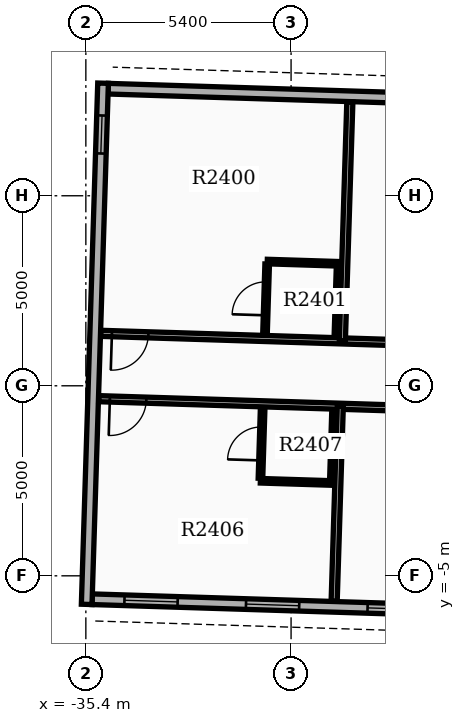
"""IFC4 building model, lengths in metres.
Left out: names, types, materials, properties, quantities, classifications, styles, units other than length and angle.
Written with IfcOpenShell. Run it as: python <this file> out.ifc"""

import sys

from ifc_helpers import new_model, si_unit, direction, frame, frame_2d, origin, place, context, subcontext, project, spatial, rectangle, extrude, element, fill, save


model = new_model("IFC4")
c1 = context("Model", 3, precision=1e-05, world=origin(), true_north=direction((0.0, 1.0)))
c2 = subcontext(c1, "Body", "Model", "MODEL_VIEW")
j1 = project(units=[si_unit("LENGTHUNIT", "METRE"), si_unit("PLANEANGLEUNIT", "RADIAN")], contexts=[c1])
p1 = place(None, origin())
s1 = spatial("IfcSite", under=j1, at=p1, CompositionType="ELEMENT")
p2 = place(p1, origin())
s2 = spatial("IfcBuilding", under=s1, at=p2, CompositionType="ELEMENT")
p3 = place(p2, frame((0.0, 0.0, 152.7)))
s3 = spatial("IfcBuildingStorey", under=s2, at=p3, CompositionType="ELEMENT", Elevation=152.7)
p4 = place(p3, frame((-14.721, 7.186, 0.0), z_axis=(0.0, 0.0, 1.0), x_axis=(-0.999506574096, 0.031410322165, 0.0)))
e1 = element("IfcWall", 1, at=p4, inside=s3, PredefinedType="STANDARD", context=c2, shape_type="SweptSolid", body=[
    extrude(rectangle(XDim=20.1, YDim=0.28, at=frame_2d((10.05, 0.0))), origin(), (0.0, 0.0, 1.0), 2.97),
])
p5 = place(p4, frame((0.85, 0.0, 0.8)))
e2 = element("IfcOpeningElement", 2, at=p5, cuts=e1, PredefinedType="OPENING", context=c2, shape_type="SweptSolid", body=[
    extrude(rectangle(XDim=1.4, YDim=1.6, at=frame_2d((0.7, 0.8))), frame((0.0, 0.15, 0.0), z_axis=(0.0, -1.0, 0.0), x_axis=(1.0, 0.0, 0.0)), (0.0, 0.0, 1.0), 0.3),
])
p6 = place(p4, frame((4.05, 0.0, 0.8)))
e3 = element("IfcOpeningElement", 3, at=p6, cuts=e1, PredefinedType="OPENING", context=c2, shape_type="SweptSolid", body=[
    extrude(rectangle(XDim=1.4, YDim=1.6, at=frame_2d((0.7, 0.8))), frame((0.0, 0.15, 0.0), z_axis=(0.0, -1.0, 0.0), x_axis=(1.0, 0.0, 0.0)), (0.0, 0.0, 1.0), 0.3),
])
p7 = place(p4, frame((7.25, 0.0, 0.8)))
e4 = element("IfcOpeningElement", 4, at=p7, cuts=e1, PredefinedType="OPENING", context=c2, shape_type="SweptSolid", body=[
    extrude(rectangle(XDim=1.4, YDim=1.6, at=frame_2d((0.7, 0.8))), frame((0.0, 0.15, 0.0), z_axis=(0.0, -1.0, 0.0), x_axis=(1.0, 0.0, 0.0)), (0.0, 0.0, 1.0), 0.3),
])
p8 = place(p4, frame((10.45, 0.0, 0.8)))
e5 = element("IfcOpeningElement", 5, at=p8, cuts=e1, PredefinedType="OPENING", context=c2, shape_type="SweptSolid", body=[
    extrude(rectangle(XDim=1.4, YDim=1.6, at=frame_2d((0.7, 0.8))), frame((0.0, 0.15, 0.0), z_axis=(0.0, -1.0, 0.0), x_axis=(1.0, 0.0, 0.0)), (0.0, 0.0, 1.0), 0.3),
])
p9 = place(p3, frame((-35.234, -5.616, 0.0), z_axis=(0.0, 0.0, 1.0), x_axis=(0.999506955354, -0.031398187845, 0.0)))
e6 = element("IfcWall", 6, at=p9, inside=s3, PredefinedType="STANDARD", context=c2, shape_type="SweptSolid", body=[
    extrude(rectangle(XDim=20.1, YDim=0.28, at=frame_2d((10.05, 0.0))), origin(), (0.0, 0.0, 1.0), 2.97),
])
p10 = place(p9, frame((0.85, 0.0, 0.8)))
e7 = element("IfcOpeningElement", 7, at=p10, cuts=e6, PredefinedType="OPENING", context=c2, shape_type="SweptSolid", body=[
    extrude(rectangle(XDim=1.4, YDim=1.6, at=frame_2d((0.7, 0.8))), frame((0.0, 0.15, 0.0), z_axis=(0.0, -1.0, 0.0), x_axis=(1.0, 0.0, 0.0)), (0.0, 0.0, 1.0), 0.3),
])
p11 = place(p9, frame((4.05, 0.0, 0.8)))
e8 = element("IfcOpeningElement", 8, at=p11, cuts=e6, PredefinedType="OPENING", context=c2, shape_type="SweptSolid", body=[
    extrude(rectangle(XDim=1.4, YDim=1.6, at=frame_2d((0.7, 0.8))), frame((0.0, 0.15, 0.0), z_axis=(0.0, -1.0, 0.0), x_axis=(1.0, 0.0, 0.0)), (0.0, 0.0, 1.0), 0.3),
])
p12 = place(p9, frame((7.25, 0.0, 0.8)))
e9 = element("IfcOpeningElement", 9, at=p12, cuts=e6, PredefinedType="OPENING", context=c2, shape_type="SweptSolid", body=[
    extrude(rectangle(XDim=1.4, YDim=1.6, at=frame_2d((0.7, 0.8))), frame((0.0, 0.15, 0.0), z_axis=(0.0, -1.0, 0.0), x_axis=(1.0, 0.0, 0.0)), (0.0, 0.0, 1.0), 0.3),
])
p13 = place(p9, frame((10.45, 0.0, 0.8)))
e10 = element("IfcOpeningElement", 10, at=p13, cuts=e6, PredefinedType="OPENING", context=c2, shape_type="SweptSolid", body=[
    extrude(rectangle(XDim=1.4, YDim=1.6, at=frame_2d((0.7, 0.8))), frame((0.0, 0.15, 0.0), z_axis=(0.0, -1.0, 0.0), x_axis=(1.0, 0.0, 0.0)), (0.0, 0.0, 1.0), 0.3),
])
p14 = place(p9, frame((14.035, 0.0, 0.85)))
e11 = element("IfcOpeningElement", 11, at=p14, cuts=e6, PredefinedType="OPENING", context=c2, shape_type="SweptSolid", body=[
    extrude(rectangle(XDim=1.2, YDim=1.6, at=frame_2d((0.6, 0.8))), frame((0.0, 0.15, 0.0), z_axis=(0.0, -1.0, 0.0), x_axis=(1.0, 0.0, 0.0)), (0.0, 0.0, 1.0), 0.3),
])
p15 = place(p3, frame((-34.947, 7.962, 0.0), z_axis=(0.0, 0.0, 1.0), x_axis=(-0.031406966164, -0.999506679556, 0.0)))
e12 = element("IfcWall", 12, at=p15, inside=s3, PredefinedType="STANDARD", context=c2, shape_type="SweptSolid", body=[
    extrude(rectangle(XDim=13.72, YDim=0.28, at=frame_2d((6.86, 0.0))), origin(), (0.0, 0.0, 1.0), 2.97),
])
p16 = place(p15, frame((0.85, 0.0, 0.85)))
e13 = element("IfcOpeningElement", 13, at=p16, cuts=e12, PredefinedType="OPENING", context=c2, shape_type="SweptSolid", body=[
    extrude(rectangle(XDim=1.0, YDim=1.5, at=frame_2d((0.5, 0.75))), frame((0.0, 0.15, 0.0), z_axis=(0.0, -1.0, 0.0), x_axis=(1.0, 0.0, 0.0)), (0.0, 0.0, 1.0), 0.3),
])
p17 = place(p3, frame((-14.834, 0.746, 0.0), z_axis=(0.0, 0.0, 1.0), x_axis=(-0.99950639469, 0.031416030536, 0.0)))
e14 = element("IfcWall", 14, at=p17, inside=s3, PredefinedType="PARTITIONING", context=c2, shape_type="SweptSolid", body=[
    extrude(rectangle(XDim=20.182, YDim=0.16, at=frame_2d((10.091, 0.0))), origin(), (0.0, 0.0, 1.0), 2.96),
])
p18 = place(p17, frame((2.661, 0.0, 0.0)))
e15 = element("IfcOpeningElement", 15, at=p18, cuts=e14, PredefinedType="OPENING", context=c2, shape_type="SweptSolid", body=[
    extrude(rectangle(XDim=0.96, YDim=2.15, at=frame_2d((0.48, 1.075))), frame((0.0, 0.09, 0.0), z_axis=(0.0, -1.0, 0.0), x_axis=(1.0, 0.0, 0.0)), (0.0, 0.0, 1.0), 0.18),
])
p19 = place(p17, frame((9.492, 0.0, 0.0)))
e16 = element("IfcOpeningElement", 16, at=p19, cuts=e14, PredefinedType="OPENING", context=c2, shape_type="SweptSolid", body=[
    extrude(rectangle(XDim=0.96, YDim=2.15, at=frame_2d((0.48, 1.075))), frame((0.0, 0.09, 0.0), z_axis=(0.0, -1.0, 0.0), x_axis=(1.0, 0.0, 0.0)), (0.0, 0.0, 1.0), 0.18),
])
p20 = place(p17, frame((18.93, 0.0, 0.0)))
e17 = element("IfcOpeningElement", 17, at=p20, cuts=e14, PredefinedType="OPENING", context=c2, shape_type="SweptSolid", body=[
    extrude(rectangle(XDim=0.96, YDim=2.15, at=frame_2d((0.48, 1.075))), frame((0.0, 0.09, 0.0), z_axis=(0.0, -1.0, 0.0), x_axis=(1.0, 0.0, 0.0)), (0.0, 0.0, 1.0), 0.18),
])
p21 = place(p3, frame((-28.651, 1.18, 0.0), z_axis=(0.0, 0.0, 1.0), x_axis=(0.031389803569, 0.999507218699, 0.0)))
e18 = element("IfcWall", 18, at=p21, inside=s3, PredefinedType="PARTITIONING", context=c2, shape_type="SweptSolid", body=[
    extrude(rectangle(XDim=6.292, YDim=0.16, at=frame_2d((3.146, 0.0))), origin(), (0.0, 0.0, 1.0), 2.96),
])
p22 = place(p3, frame((-30.686, 1.385, 0.0), z_axis=(0.0, 0.0, 1.0), x_axis=(0.03152371574, 0.999503004171, 0.0)))
e19 = element("IfcWall", 19, at=p22, inside=s3, PredefinedType="PARTITIONING", context=c2, shape_type="SweptSolid", body=[
    extrude(rectangle(XDim=1.82, YDim=0.12, at=frame_2d((0.91, 0.0))), origin(), (0.0, 0.0, 1.0), 2.96),
])
p23 = place(p22, frame((0.47, 0.0, 0.0)))
e20 = element("IfcOpeningElement", 20, at=p23, cuts=e19, PredefinedType="OPENING", context=c2, shape_type="SweptSolid", body=[
    extrude(rectangle(XDim=0.88, YDim=2.1, at=frame_2d((0.44, 1.05))), frame((0.0, 0.07, 0.0), z_axis=(0.0, -1.0, 0.0), x_axis=(1.0, 0.0, 0.0)), (0.0, 0.0, 1.0), 0.14),
])
p24 = place(p3, frame((-28.807, 1.325, 0.0), z_axis=(0.0, 0.0, 1.0), x_axis=(0.031389704724, 0.999507221803, 0.0)))
e21 = element("IfcWall", 21, at=p24, inside=s3, PredefinedType="PARTITIONING", context=c2, shape_type="SweptSolid", body=[
    extrude(rectangle(XDim=1.82, YDim=0.12, at=frame_2d((0.91, 0.0))), origin(), (0.0, 0.0, 1.0), 2.96),
])
p25 = place(p3, frame((-28.747, 3.21, 0.0), z_axis=(0.0, 0.0, 1.0), x_axis=(-0.999510173889, 0.031295563454, 0.0)))
e22 = element("IfcWall", 22, at=p25, inside=s3, PredefinedType="PARTITIONING", context=c2, shape_type="SweptSolid", body=[
    extrude(rectangle(XDim=1.88, YDim=0.12, at=frame_2d((0.94, 0.0))), origin(), (0.0, 0.0, 1.0), 2.96),
])
p26 = place(p3, frame((-14.888, -0.973, 0.0), z_axis=(0.0, 0.0, 1.0), x_axis=(-0.99950639469, 0.031416030536, 0.0)))
e23 = element("IfcWall", 23, at=p26, inside=s3, PredefinedType="PARTITIONING", context=c2, shape_type="SweptSolid", body=[
    extrude(rectangle(XDim=20.182, YDim=0.16, at=frame_2d((10.091, 0.0))), origin(), (0.0, 0.0, 1.0), 2.96),
])
p27 = place(p26, frame((2.661, 0.0, 0.0)))
e24 = element("IfcOpeningElement", 24, at=p27, cuts=e23, PredefinedType="OPENING", context=c2, shape_type="SweptSolid", body=[
    extrude(rectangle(XDim=0.96, YDim=2.15, at=frame_2d((0.48, 1.075))), frame((0.0, 0.09, 0.0), z_axis=(0.0, -1.0, 0.0), x_axis=(1.0, 0.0, 0.0)), (0.0, 0.0, 1.0), 0.18),
])
p28 = place(p26, frame((9.492, 0.0, 0.0)))
e25 = element("IfcOpeningElement", 25, at=p28, cuts=e23, PredefinedType="OPENING", context=c2, shape_type="SweptSolid", body=[
    extrude(rectangle(XDim=0.96, YDim=2.15, at=frame_2d((0.48, 1.075))), frame((0.0, 0.09, 0.0), z_axis=(0.0, -1.0, 0.0), x_axis=(1.0, 0.0, 0.0)), (0.0, 0.0, 1.0), 0.18),
])
p29 = place(p26, frame((18.93, 0.0, 0.0)))
e26 = element("IfcOpeningElement", 26, at=p29, cuts=e23, PredefinedType="OPENING", context=c2, shape_type="SweptSolid", body=[
    extrude(rectangle(XDim=0.96, YDim=2.15, at=frame_2d((0.48, 1.075))), frame((0.0, 0.09, 0.0), z_axis=(0.0, -1.0, 0.0), x_axis=(1.0, 0.0, 0.0)), (0.0, 0.0, 1.0), 0.18),
])
p30 = place(p3, frame((-28.705, -0.539, 0.0), z_axis=(0.0, 0.0, 1.0), x_axis=(-0.031396631422, -0.999507004245, 0.0)))
e27 = element("IfcWall", 27, at=p30, inside=s3, PredefinedType="PARTITIONING", context=c2, shape_type="SweptSolid", body=[
    extrude(rectangle(XDim=5.132, YDim=0.16, at=frame_2d((2.566, 0.0))), origin(), (0.0, 0.0, 1.0), 2.96),
])
p31 = place(p3, frame((-30.806, -2.434, 0.0), z_axis=(0.0, 0.0, 1.0), x_axis=(0.031389704724, 0.999507221803, 0.0)))
e28 = element("IfcWall", 28, at=p31, inside=s3, PredefinedType="PARTITIONING", context=c2, shape_type="SweptSolid", body=[
    extrude(rectangle(XDim=1.82, YDim=0.12, at=frame_2d((0.91, 0.0))), origin(), (0.0, 0.0, 1.0), 2.96),
])
p32 = place(p31, frame((0.47, 0.0, 0.0)))
e29 = element("IfcOpeningElement", 29, at=p32, cuts=e28, PredefinedType="OPENING", context=c2, shape_type="SweptSolid", body=[
    extrude(rectangle(XDim=0.88, YDim=2.1, at=frame_2d((0.44, 1.05))), frame((0.0, 0.07, 0.0), z_axis=(0.0, -1.0, 0.0), x_axis=(1.0, 0.0, 0.0)), (0.0, 0.0, 1.0), 0.14),
])
p33 = place(p3, frame((-28.927, -2.493, 0.0), z_axis=(0.0, 0.0, 1.0), x_axis=(0.031389704724, 0.999507221803, 0.0)))
e30 = element("IfcWall", 30, at=p33, inside=s3, PredefinedType="PARTITIONING", context=c2, shape_type="SweptSolid", body=[
    extrude(rectangle(XDim=1.82, YDim=0.12, at=frame_2d((0.91, 0.0))), origin(), (0.0, 0.0, 1.0), 2.96),
])
p34 = place(p3, frame((-28.929, -2.558, 0.0), z_axis=(0.0, 0.0, 1.0), x_axis=(-0.999505975261, 0.031429371883, 0.0)))
e31 = element("IfcWall", 31, at=p34, inside=s3, PredefinedType="PARTITIONING", context=c2, shape_type="SweptSolid", body=[
    extrude(rectangle(XDim=1.88, YDim=0.12, at=frame_2d((0.94, 0.0))), origin(), (0.0, 0.0, 1.0), 2.96),
])
p35 = place(p10, origin())
e32 = element("IfcWindow", 32, at=p35, inside=s3, PartitioningType="SINGLE_PANEL", PredefinedType="WINDOW", context=c2, shape_type="SweptSolid", body=[
    extrude(rectangle(XDim=1.4, YDim=1.6, at=frame_2d((0.7, 0.8))), frame((0.0, 0.03, 0.0), z_axis=(0.0, -1.0, 0.0), x_axis=(1.0, 0.0, 0.0)), (0.0, 0.0, 1.0), 0.06),
])
fill(e7, e32)
p36 = place(p11, origin())
e33 = element("IfcWindow", 33, at=p36, inside=s3, PartitioningType="SINGLE_PANEL", PredefinedType="WINDOW", context=c2, shape_type="SweptSolid", body=[
    extrude(rectangle(XDim=1.4, YDim=1.6, at=frame_2d((0.7, 0.8))), frame((0.0, 0.03, 0.0), z_axis=(0.0, -1.0, 0.0), x_axis=(1.0, 0.0, 0.0)), (0.0, 0.0, 1.0), 0.06),
])
fill(e8, e33)
p37 = place(p12, origin())
e34 = element("IfcWindow", 34, at=p37, inside=s3, PartitioningType="SINGLE_PANEL", PredefinedType="WINDOW", context=c2, shape_type="SweptSolid", body=[
    extrude(rectangle(XDim=1.4, YDim=1.6, at=frame_2d((0.7, 0.8))), frame((0.0, 0.03, 0.0), z_axis=(0.0, -1.0, 0.0), x_axis=(1.0, 0.0, 0.0)), (0.0, 0.0, 1.0), 0.06),
])
fill(e9, e34)
p38 = place(p16, origin())
e35 = element("IfcWindow", 35, at=p38, inside=s3, PartitioningType="SINGLE_PANEL", PredefinedType="WINDOW", context=c2, shape_type="SweptSolid", body=[
    extrude(rectangle(XDim=1.0, YDim=1.5, at=frame_2d((0.5, 0.75))), frame((0.0, 0.03, 0.0), z_axis=(0.0, -1.0, 0.0), x_axis=(1.0, 0.0, 0.0)), (0.0, 0.0, 1.0), 0.06),
])
fill(e13, e35)
p39 = place(p20, origin())
e36 = element("IfcDoor", 36, at=p39, inside=s3, OperationType="SINGLE_SWING_RIGHT", PredefinedType="DOOR", context=c2, shape_type="SweptSolid", body=[
    extrude(rectangle(XDim=0.96, YDim=2.15, at=frame_2d((0.48, 1.075))), frame((0.0, 0.025, 0.0), z_axis=(0.0, -1.0, 0.0), x_axis=(1.0, 0.0, 0.0)), (0.0, 0.0, 1.0), 0.05),
])
fill(e17, e36)
p40 = place(p23, origin())
e37 = element("IfcDoor", 37, at=p40, inside=s3, OperationType="SINGLE_SWING_LEFT", PredefinedType="DOOR", context=c2, shape_type="SweptSolid", body=[
    extrude(rectangle(XDim=0.88, YDim=2.1, at=frame_2d((0.44, 1.05))), frame((0.0, 0.025, 0.0), z_axis=(0.0, -1.0, 0.0), x_axis=(1.0, 0.0, 0.0)), (0.0, 0.0, 1.0), 0.05),
])
fill(e20, e37)
p41 = place(p29, origin())
e38 = element("IfcDoor", 38, at=p41, inside=s3, OperationType="SINGLE_SWING_RIGHT", PredefinedType="DOOR", context=c2, shape_type="SweptSolid", body=[
    extrude(rectangle(XDim=0.96, YDim=2.15, at=frame_2d((0.48, 1.075))), frame((0.0, 0.025, 0.0), z_axis=(0.0, -1.0, 0.0), x_axis=(1.0, 0.0, 0.0)), (0.0, 0.0, 1.0), 0.05),
])
fill(e26, e38)
p42 = place(p32, origin())
e39 = element("IfcDoor", 39, at=p42, inside=s3, OperationType="SINGLE_SWING_LEFT", PredefinedType="DOOR", context=c2, shape_type="SweptSolid", body=[
    extrude(rectangle(XDim=0.88, YDim=2.1, at=frame_2d((0.44, 1.05))), frame((0.0, 0.025, 0.0), z_axis=(0.0, -1.0, 0.0), x_axis=(1.0, 0.0, 0.0)), (0.0, 0.0, 1.0), 0.05),
])
fill(e29, e39)
save(model, sys.argv[1])
